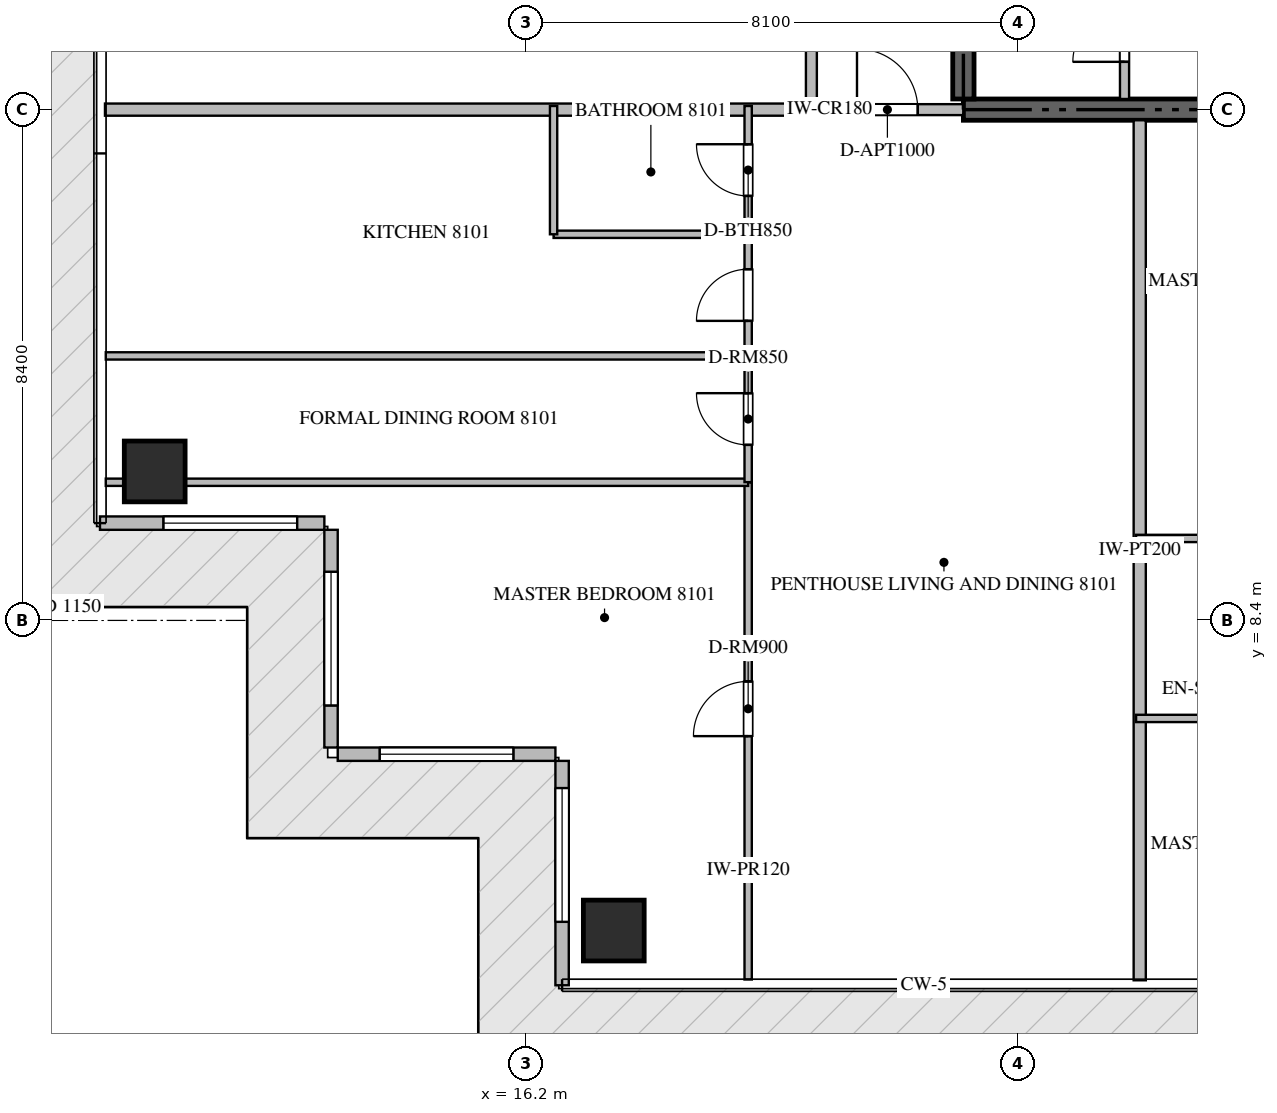
"""IFC4 building model, lengths in metres.
Left out: names, types, materials, properties, quantities, classifications, styles, units other than length and angle.
Written with IfcOpenShell. Run it as: python <this file> out.ifc"""

import sys

from ifc_helpers import new_model, si_unit, direction, frame, frame_2d, origin, origin_2d, place, context, subcontext, project, spatial, rectangle, extrude, source, transform, mapped, element, fill, save


model = new_model("IFC4")
c1 = context("Model", 3, precision=1e-05, world=origin(), true_north=direction((0.0, 1.0)))
c2 = subcontext(c1, "Body", "Model", "MODEL_VIEW")
j1 = project(units=[si_unit("LENGTHUNIT", "METRE"), si_unit("PLANEANGLEUNIT", "RADIAN")], contexts=[c1])
p1 = place(None, origin())
s1 = spatial("IfcSite", under=j1, at=p1, CompositionType="ELEMENT")
p2 = place(p1, origin())
s2 = spatial("IfcBuilding", under=s1, at=p2, CompositionType="ELEMENT")
p3 = place(p2, frame((0.0, 0.0, 325.85)))
s3 = spatial("IfcBuildingStorey", under=s2, at=p3, CompositionType="ELEMENT", Elevation=325.85)
p4 = place(p3, frame((23.4, 16.8, -0.26), z_axis=(0.0, 0.0, 1.0), x_axis=(1.0, 0.0, 0.0)))
e1 = element("IfcWall", 1, at=p4, inside=s3, PredefinedType="SHEAR", context=c2, shape_type="SweptSolid", body=[
    extrude(rectangle(XDim=18.0, YDim=0.35, at=frame_2d((9.0, 0.0))), origin(), (0.0, 0.0, 1.0), 4.048),
])
p5 = place(p3, frame((23.4, 16.975, -0.26), z_axis=(0.0, 0.0, 1.0), x_axis=(0.0, 1.0, 0.0)))
e2 = element("IfcWall", 2, at=p5, inside=s3, PredefinedType="SHEAR", context=c2, shape_type="SweptSolid", body=[
    extrude(rectangle(XDim=4.875, YDim=0.35, at=frame_2d((2.438, 0.0))), origin(), (0.0, 0.0, 1.0), 4.048),
])
m1 = source(origin(), c2, "Body", "SweptSolid", [
    extrude(rectangle(XDim=1.0, YDim=1.0, at=origin_2d()), origin(), (0.0, 0.0, 1.0), 4.05),
])
for number, where, z_axis, x_axis in (
    (3, (17.65, 3.3, -0.26), (0.0, 0.0, 1.0), (1.0, 0.0, 0.0)),
    (4, (10.1, 10.85, -0.26), (0.0, 0.0, 1.0), (1.0, 0.0, 0.0)),
):
    element("IfcColumn", number, at=place(p3, frame(where, z_axis=z_axis, x_axis=x_axis)), inside=s3, PredefinedType="COLUMN", context=c2, shape_type="MappedRepresentation", body=[
        mapped(m1, transform((0.0, 0.0, 0.0), scale=1.0)),
    ])
p6 = place(p3, frame((9.2, 10.0, 0.0), z_axis=(0.0, 0.0, 1.0), x_axis=(1.0, 0.0, 0.0)))
e5 = element("IfcWall", 5, at=p6, inside=s3, PredefinedType="ELEMENTEDWALL", context=c2, shape_type="SweptSolid", body=[
    extrude(rectangle(XDim=3.69, YDim=0.22, at=frame_2d((1.845, 0.0))), origin(), (0.0, 0.0, 1.0), 3.775),
])
p7 = place(p6, frame((1.043, 0.0, 0.65)))
e6 = element("IfcOpeningElement", 6, at=p7, cuts=e5, PredefinedType="OPENING", context=c2, shape_type="SweptSolid", body=[
    extrude(rectangle(XDim=2.2, YDim=2.4, at=frame_2d((1.1, 1.2))), frame((0.0, 0.12, 0.0), z_axis=(0.0, -1.0, 0.0), x_axis=(1.0, 0.0, 0.0)), (0.0, 0.0, 1.0), 0.24),
])
p8 = place(p3, frame((13.0, 9.89, 0.0), z_axis=(0.0, 0.0, 1.0), x_axis=(0.0, -1.0, 0.0)))
e7 = element("IfcWall", 7, at=p8, inside=s3, PredefinedType="ELEMENTEDWALL", context=c2, shape_type="SweptSolid", body=[
    extrude(rectangle(XDim=3.58, YDim=0.22, at=frame_2d((1.79, 0.0))), origin(), (0.0, 0.0, 1.0), 3.775),
])
p9 = place(p8, frame((0.69, 0.0, 0.65)))
e8 = element("IfcOpeningElement", 8, at=p9, cuts=e7, PredefinedType="OPENING", context=c2, shape_type="SweptSolid", body=[
    extrude(rectangle(XDim=2.2, YDim=2.4, at=frame_2d((1.1, 1.2))), frame((0.0, 0.12, 0.0), z_axis=(0.0, -1.0, 0.0), x_axis=(1.0, 0.0, 0.0)), (0.0, 0.0, 1.0), 0.24),
])
p10 = place(p3, frame((13.11, 6.2, 0.0), z_axis=(0.0, 0.0, 1.0), x_axis=(1.0, 0.0, 0.0)))
e9 = element("IfcWall", 9, at=p10, inside=s3, PredefinedType="ELEMENTEDWALL", context=c2, shape_type="SweptSolid", body=[
    extrude(rectangle(XDim=3.58, YDim=0.22, at=frame_2d((1.79, 0.0))), origin(), (0.0, 0.0, 1.0), 3.775),
])
p11 = place(p10, frame((0.69, 0.0, 0.65)))
e10 = element("IfcOpeningElement", 10, at=p11, cuts=e9, PredefinedType="OPENING", context=c2, shape_type="SweptSolid", body=[
    extrude(rectangle(XDim=2.2, YDim=2.4, at=frame_2d((1.1, 1.2))), frame((0.0, 0.12, 0.0), z_axis=(0.0, -1.0, 0.0), x_axis=(1.0, 0.0, 0.0)), (0.0, 0.0, 1.0), 0.24),
])
p12 = place(p3, frame((16.8, 6.09, 0.0), z_axis=(0.0, 0.0, 1.0), x_axis=(0.0, -1.0, 0.0)))
e11 = element("IfcWall", 11, at=p12, inside=s3, PredefinedType="ELEMENTEDWALL", context=c2, shape_type="SweptSolid", body=[
    extrude(rectangle(XDim=3.69, YDim=0.22, at=frame_2d((1.845, 0.0))), origin(), (0.0, 0.0, 1.0), 3.775),
])
p13 = place(p12, frame((0.447, 0.0, 0.65)))
e12 = element("IfcOpeningElement", 12, at=p13, cuts=e11, PredefinedType="OPENING", context=c2, shape_type="SweptSolid", body=[
    extrude(rectangle(XDim=2.2, YDim=2.4, at=frame_2d((1.1, 1.2))), frame((0.0, 0.12, 0.0), z_axis=(0.0, -1.0, 0.0), x_axis=(1.0, 0.0, 0.0)), (0.0, 0.0, 1.0), 0.24),
])
p14 = place(p3, frame((26.05, 16.975, 0.0), z_axis=(0.0, 0.0, 1.0), x_axis=(0.0, 1.0, 0.0)))
e13 = element("IfcWall", 13, at=p14, inside=s3, PredefinedType="PARTITIONING", context=c2, shape_type="SweptSolid", body=[
    extrude(rectangle(XDim=2.073, YDim=0.15, at=frame_2d((1.037, 0.0))), origin(), (0.0, 0.0, 1.0), 3.79),
])
p15 = place(p14, frame((0.611, 0.0, 0.0)))
e14 = element("IfcOpeningElement", 14, at=p15, cuts=e13, PredefinedType="OPENING", context=c2, shape_type="SweptSolid", body=[
    extrude(rectangle(XDim=0.85, YDim=2.1, at=frame_2d((0.425, 1.05))), frame((0.0, 0.085, 0.0), z_axis=(0.0, -1.0, 0.0), x_axis=(1.0, 0.0, 0.0)), (0.0, 0.0, 1.0), 0.17),
])
p16 = place(p3, frame((26.3, 2.482, 0.0), z_axis=(0.0, 0.0, 1.0), x_axis=(0.0, 1.0, 0.0)))
e15 = element("IfcWall", 15, at=p16, inside=s3, PredefinedType="PARTITIONING", context=c2, shape_type="SweptSolid", body=[
    extrude(rectangle(XDim=14.143, YDim=0.2, at=frame_2d((7.072, 0.0))), origin(), (0.0, 0.0, 1.0), 3.79),
])
p17 = place(p3, frame((9.282, 16.8, 0.0), z_axis=(0.0, 0.0, 1.0), x_axis=(1.0, 0.0, 0.0)))
e16 = element("IfcWall", 16, at=p17, inside=s3, PredefinedType="PARTITIONING", context=c2, shape_type="SweptSolid", body=[
    extrude(rectangle(XDim=11.618, YDim=0.2, at=frame_2d((5.809, 0.0))), origin(), (0.0, 0.0, 1.0), 3.79),
])
p18 = place(p3, frame((20.902, 16.8, 0.0), z_axis=(0.0, 0.0, 1.0), x_axis=(1.0, 0.0, 0.0)))
e17 = element("IfcWall", 17, at=p18, inside=s3, PredefinedType="PARTITIONING", context=c2, shape_type="SweptSolid", body=[
    extrude(rectangle(XDim=2.496, YDim=0.18, at=frame_2d((1.248, 0.0))), origin(), (0.0, 0.0, 1.0), 3.79),
])
p19 = place(p18, frame((0.748, 0.0, 0.0)))
e18 = element("IfcOpeningElement", 18, at=p19, cuts=e17, PredefinedType="OPENING", context=c2, shape_type="SweptSolid", body=[
    extrude(rectangle(XDim=1.0, YDim=2.15, at=frame_2d((0.5, 1.075))), frame((0.0, 0.1, 0.0), z_axis=(0.0, -1.0, 0.0), x_axis=(1.0, 0.0, 0.0)), (0.0, 0.0, 1.0), 0.2),
])
p20 = place(p3, frame((20.9, 16.8, 0.0), z_axis=(0.0, 0.0, 1.0), x_axis=(0.0, 1.0, 0.0)))
e19 = element("IfcWall", 19, at=p20, inside=s3, PredefinedType="PARTITIONING", context=c2, shape_type="SweptSolid", body=[
    extrude(rectangle(XDim=16.8, YDim=0.18, at=frame_2d((8.4, 0.0))), origin(), (0.0, 0.0, 1.0), 3.79),
])
p21 = place(p20, frame((2.67, 0.0, 0.0)))
e20 = element("IfcOpeningElement", 20, at=p21, cuts=e19, PredefinedType="OPENING", context=c2, shape_type="SweptSolid", body=[
    extrude(rectangle(XDim=1.0, YDim=2.15, at=frame_2d((0.5, 1.075))), frame((0.0, 0.1, 0.0), z_axis=(0.0, -1.0, 0.0), x_axis=(1.0, 0.0, 0.0)), (0.0, 0.0, 1.0), 0.2),
])
p22 = place(p20, frame((11.107, 0.0, 0.0)))
e21 = element("IfcOpeningElement", 21, at=p22, cuts=e19, PredefinedType="OPENING", context=c2, shape_type="SweptSolid", body=[
    extrude(rectangle(XDim=1.0, YDim=2.15, at=frame_2d((0.5, 1.075))), frame((0.0, 0.1, 0.0), z_axis=(0.0, -1.0, 0.0), x_axis=(1.0, 0.0, 0.0)), (0.0, 0.0, 1.0), 0.2),
])
p23 = place(p3, frame((19.86, 2.495, 0.0), z_axis=(0.0, 0.0, 1.0), x_axis=(0.0, 1.0, 0.0)))
e22 = element("IfcWall", 22, at=p23, inside=s3, PredefinedType="PARTITIONING", context=c2, shape_type="SweptSolid", body=[
    extrude(rectangle(XDim=8.177, YDim=0.12, at=frame_2d((4.088, 0.0))), origin(), (0.0, 0.0, 1.0), 3.79),
])
p24 = place(p23, frame((4.002, 0.0, 0.0)))
e23 = element("IfcOpeningElement", 23, at=p24, cuts=e22, PredefinedType="OPENING", context=c2, shape_type="SweptSolid", body=[
    extrude(rectangle(XDim=0.9, YDim=2.1, at=frame_2d((0.45, 1.05))), frame((0.0, 0.07, 0.0), z_axis=(0.0, -1.0, 0.0), x_axis=(1.0, 0.0, 0.0)), (0.0, 0.0, 1.0), 0.14),
])
p25 = place(p3, frame((9.295, 10.672, 0.0), z_axis=(0.0, 0.0, 1.0), x_axis=(1.0, 0.0, 0.0)))
e24 = element("IfcWall", 24, at=p25, inside=s3, PredefinedType="PARTITIONING", context=c2, shape_type="SweptSolid", body=[
    extrude(rectangle(XDim=10.565, YDim=0.12, at=frame_2d((5.283, 0.0))), origin(), (0.0, 0.0, 1.0), 3.292),
])
p26 = place(p3, frame((9.295, 12.75, 0.0), z_axis=(0.0, 0.0, 1.0), x_axis=(1.0, 0.0, 0.0)))
e25 = element("IfcWall", 25, at=p26, inside=s3, PredefinedType="PARTITIONING", context=c2, shape_type="SweptSolid", body=[
    extrude(rectangle(XDim=10.565, YDim=0.12, at=frame_2d((5.283, 0.0))), origin(), (0.0, 0.0, 1.0), 3.79),
])
p27 = place(p3, frame((16.66, 14.75, 0.0), z_axis=(0.0, 0.0, 1.0), x_axis=(1.0, 0.0, 0.0)))
e26 = element("IfcWall", 26, at=p27, inside=s3, PredefinedType="PARTITIONING", context=c2, shape_type="SweptSolid", body=[
    extrude(rectangle(XDim=3.2, YDim=0.12, at=frame_2d((1.6, 0.0))), origin(), (0.0, 0.0, 1.0), 3.79),
])
p28 = place(p3, frame((16.66, 14.75, 0.0), z_axis=(0.0, 0.0, 1.0), x_axis=(0.0, 1.0, 0.0)))
e27 = element("IfcWall", 27, at=p28, inside=s3, PredefinedType="PARTITIONING", context=c2, shape_type="SweptSolid", body=[
    extrude(rectangle(XDim=2.11, YDim=0.12, at=frame_2d((1.055, 0.0))), origin(), (0.0, 0.0, 1.0), 3.79),
])
p29 = place(p3, frame((19.86, 10.674, 0.0), z_axis=(0.0, 0.0, 1.0), x_axis=(0.0, 1.0, 0.0)))
e28 = element("IfcWall", 28, at=p29, inside=s3, PredefinedType="PARTITIONING", context=c2, shape_type="SweptSolid", body=[
    extrude(rectangle(XDim=2.076, YDim=0.12, at=frame_2d((1.038, 0.0))), origin(), (0.0, 0.0, 1.0), 3.79),
])
p30 = place(p29, frame((0.613, 0.0, 0.0)))
e29 = element("IfcOpeningElement", 29, at=p30, cuts=e28, PredefinedType="OPENING", context=c2, shape_type="SweptSolid", body=[
    extrude(rectangle(XDim=0.85, YDim=2.1, at=frame_2d((0.425, 1.05))), frame((0.0, 0.07, 0.0), z_axis=(0.0, -1.0, 0.0), x_axis=(1.0, 0.0, 0.0)), (0.0, 0.0, 1.0), 0.14),
])
p31 = place(p3, frame((19.86, 12.752, 0.0), z_axis=(0.0, 0.0, 1.0), x_axis=(0.0, 1.0, 0.0)))
e30 = element("IfcWall", 30, at=p31, inside=s3, PredefinedType="PARTITIONING", context=c2, shape_type="SweptSolid", body=[
    extrude(rectangle(XDim=1.998, YDim=0.12, at=frame_2d((0.999, 0.0))), origin(), (0.0, 0.0, 1.0), 3.79),
])
p32 = place(p31, frame((0.574, 0.0, 0.0)))
e31 = element("IfcOpeningElement", 31, at=p32, cuts=e30, PredefinedType="OPENING", context=c2, shape_type="SweptSolid", body=[
    extrude(rectangle(XDim=0.85, YDim=2.1, at=frame_2d((0.425, 1.05))), frame((0.0, 0.07, 0.0), z_axis=(0.0, -1.0, 0.0), x_axis=(1.0, 0.0, 0.0)), (0.0, 0.0, 1.0), 0.14),
])
p33 = place(p3, frame((19.86, 14.752, 0.0), z_axis=(0.0, 0.0, 1.0), x_axis=(0.0, 1.0, 0.0)))
e32 = element("IfcWall", 32, at=p33, inside=s3, PredefinedType="PARTITIONING", context=c2, shape_type="SweptSolid", body=[
    extrude(rectangle(XDim=2.108, YDim=0.12, at=frame_2d((1.054, 0.0))), origin(), (0.0, 0.0, 1.0), 3.79),
])
p34 = place(p33, frame((0.629, 0.0, 0.0)))
e33 = element("IfcOpeningElement", 33, at=p34, cuts=e32, PredefinedType="OPENING", context=c2, shape_type="SweptSolid", body=[
    extrude(rectangle(XDim=0.85, YDim=2.1, at=frame_2d((0.425, 1.05))), frame((0.0, 0.07, 0.0), z_axis=(0.0, -1.0, 0.0), x_axis=(1.0, 0.0, 0.0)), (0.0, 0.0, 1.0), 0.14),
])
for number, where, z_axis, x_axis in (
    (34, (26.24, 6.788, 0.0), (0.0, 0.0, 1.0), (1.0, 0.0, 0.0)),
    (35, (26.24, 9.748, 0.0), (0.0, 0.0, 1.0), (1.0, 0.0, 0.0)),
):
    element("IfcWall", number, at=place(p3, frame(where, z_axis=z_axis, x_axis=x_axis)), inside=s3, PredefinedType="PARTITIONING", context=c2, shape_type="SweptSolid", body=[
        extrude(rectangle(XDim=4.79, YDim=0.12, at=frame_2d((2.395, 0.0))), origin(), (0.0, 0.0, 1.0), 3.79),
    ])
m2 = source(origin(), c2, "Body", "SweptSolid", [
    extrude(rectangle(XDim=2.2, YDim=2.4, at=frame_2d((1.1, 1.2))), frame((0.0, 0.03, 0.0), z_axis=(0.0, -1.0, 0.0), x_axis=(1.0, 0.0, 0.0)), (0.0, 0.0, 1.0), 0.06),
])
p35 = place(p7, origin())
e36 = element("IfcWindow", 36, at=p35, inside=s3, PartitioningType="SINGLE_PANEL", PredefinedType="WINDOW", context=c2, shape_type="MappedRepresentation", body=[
    mapped(m2, transform((0.0, 0.0, 0.0), scale=1.0)),
])
fill(e6, e36)
p36 = place(p9, origin())
e37 = element("IfcWindow", 37, at=p36, inside=s3, PartitioningType="SINGLE_PANEL", PredefinedType="WINDOW", context=c2, shape_type="MappedRepresentation", body=[
    mapped(m2, transform((0.0, 0.0, 0.0), scale=1.0)),
])
fill(e8, e37)
p37 = place(p11, origin())
e38 = element("IfcWindow", 38, at=p37, inside=s3, PartitioningType="SINGLE_PANEL", PredefinedType="WINDOW", context=c2, shape_type="MappedRepresentation", body=[
    mapped(m2, transform((0.0, 0.0, 0.0), scale=1.0)),
])
fill(e10, e38)
p38 = place(p13, origin())
e39 = element("IfcWindow", 39, at=p38, inside=s3, PartitioningType="SINGLE_PANEL", PredefinedType="WINDOW", context=c2, shape_type="MappedRepresentation", body=[
    mapped(m2, transform((0.0, 0.0, 0.0), scale=1.0)),
])
fill(e12, e39)
m3 = source(origin(), c2, "Body", "SweptSolid", [
    extrude(rectangle(XDim=0.85, YDim=2.1, at=frame_2d((0.425, 1.05))), frame((0.0, 0.025, 0.0), z_axis=(0.0, -1.0, 0.0), x_axis=(1.0, 0.0, 0.0)), (0.0, 0.0, 1.0), 0.05),
])
p39 = place(p15, origin())
e40 = element("IfcDoor", 40, at=p39, inside=s3, OperationType="SINGLE_SWING_LEFT", PredefinedType="DOOR", context=c2, shape_type="MappedRepresentation", body=[
    mapped(m3, transform((0.0, 0.0, 0.0), scale=1.0)),
])
fill(e14, e40)
m4 = source(origin(), c2, "Body", "SweptSolid", [
    extrude(rectangle(XDim=1.0, YDim=2.15, at=frame_2d((0.5, 1.075))), frame((0.0, 0.025, 0.0), z_axis=(0.0, -1.0, 0.0), x_axis=(1.0, 0.0, 0.0)), (0.0, 0.0, 1.0), 0.05),
])
p40 = place(p19, origin())
e41 = element("IfcDoor", 41, at=p40, inside=s3, OperationType="SINGLE_SWING_LEFT", PredefinedType="DOOR", context=c2, shape_type="MappedRepresentation", body=[
    mapped(m4, transform((0.0, 0.0, 0.0), scale=1.0)),
])
fill(e18, e41)
m5 = source(origin(), c2, "Body", "SweptSolid", [
    extrude(rectangle(XDim=0.9, YDim=2.1, at=frame_2d((0.45, 1.05))), frame((0.0, 0.025, 0.0), z_axis=(0.0, -1.0, 0.0), x_axis=(1.0, 0.0, 0.0)), (0.0, 0.0, 1.0), 0.05),
])
p41 = place(p24, origin())
e42 = element("IfcDoor", 42, at=p41, inside=s3, OperationType="SINGLE_SWING_LEFT", PredefinedType="DOOR", context=c2, shape_type="MappedRepresentation", body=[
    mapped(m5, transform((0.0, 0.0, 0.0), scale=1.0)),
])
fill(e23, e42)
p42 = place(p30, origin())
e43 = element("IfcDoor", 43, at=p42, inside=s3, OperationType="SINGLE_SWING_RIGHT", PredefinedType="DOOR", context=c2, shape_type="MappedRepresentation", body=[
    mapped(m3, transform((0.0, 0.0, 0.0), scale=1.0)),
])
fill(e29, e43)
p43 = place(p32, origin())
e44 = element("IfcDoor", 44, at=p43, inside=s3, OperationType="SINGLE_SWING_LEFT", PredefinedType="DOOR", context=c2, shape_type="MappedRepresentation", body=[
    mapped(m3, transform((0.0, 0.0, 0.0), scale=1.0)),
])
fill(e31, e44)
p44 = place(p34, origin())
e45 = element("IfcDoor", 45, at=p44, inside=s3, OperationType="SINGLE_SWING_RIGHT", PredefinedType="DOOR", context=c2, shape_type="MappedRepresentation", body=[
    mapped(m3, transform((0.0, 0.0, 0.0), scale=1.0)),
])
fill(e33, e45)
save(model, sys.argv[1])
